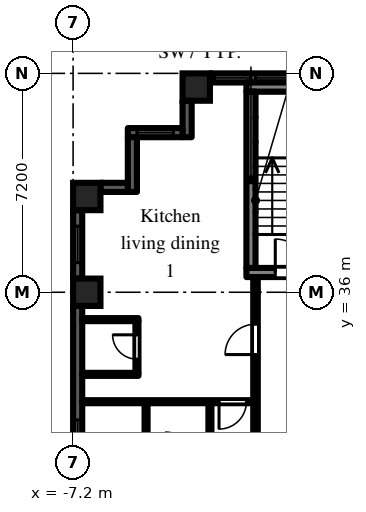
"""IFC4 building model, lengths in metres.
Left out: names, types, materials, properties, quantities, classifications, styles, units other than length and angle.
Written with IfcOpenShell. Run it as: python <this file> out.ifc"""

import sys

from ifc_helpers import new_model, si_unit, direction, frame, frame_2d, origin, origin_2d, place, context, subcontext, project, spatial, rectangle, extrude, element, fill, save


model = new_model("IFC4")
c1 = context("Model", 3, precision=1e-05, world=origin(), true_north=direction((0.0, 1.0)))
c2 = subcontext(c1, "Body", "Model", "MODEL_VIEW")
j1 = project(units=[si_unit("LENGTHUNIT", "METRE"), si_unit("PLANEANGLEUNIT", "RADIAN")], contexts=[c1])
p1 = place(None, origin())
s1 = spatial("IfcSite", under=j1, at=p1, CompositionType="ELEMENT")
p2 = place(p1, origin())
s2 = spatial("IfcBuilding", under=s1, at=p2, CompositionType="ELEMENT")
p3 = place(p2, frame((0.0, 0.0, 11.7)))
s3 = spatial("IfcBuildingStorey", under=s2, at=p3, CompositionType="ELEMENT", Elevation=11.7)
for number, where, z_axis, x_axis in (
    (1, (-6.75, 36.0, 0.0), (0.0, 0.0, 1.0), (1.0, 0.0, 0.0)),
    (2, (-6.75, 39.15, 0.0), (0.0, 0.0, 1.0), (1.0, 0.0, 0.0)),
    (3, (-3.15, 42.75, 0.0), (0.0, 0.0, 1.0), (1.0, 0.0, 0.0)),
):
    element("IfcColumn", number, at=place(p3, frame(where, z_axis=z_axis, x_axis=x_axis)), inside=s3, PredefinedType="COLUMN", context=c2, shape_type="SweptSolid", body=[
        extrude(rectangle(XDim=0.9, YDim=0.9, at=origin_2d()), origin(), (0.0, 0.0, 1.0), 3.0),
    ])
p4 = place(p3, frame((2.7, 43.05, 0.0), z_axis=(0.0, 0.0, 1.0), x_axis=(-1.0, 0.0, 0.0)))
e4 = element("IfcWall", 4, at=p4, inside=s3, PredefinedType="SOLIDWALL", context=c2, shape_type="SweptSolid", body=[
    extrude(rectangle(XDim=5.4, YDim=0.3, at=frame_2d((2.7, 0.0))), origin(), (0.0, 0.0, 1.0), 2.1),
])
p5 = place(p4, frame((1.5, 0.0, 0.2)))
e5 = element("IfcOpeningElement", 5, at=p5, cuts=e4, PredefinedType="OPENING", context=c2, shape_type="SweptSolid", body=[
    extrude(rectangle(XDim=2.4, YDim=1.85, at=frame_2d((1.2, 0.925))), frame((0.0, 0.16, 0.0), z_axis=(0.0, -1.0, 0.0), x_axis=(1.0, 0.0, 0.0)), (0.0, 0.0, 1.0), 0.32),
])
p6 = place(p4, frame((0.15, 0.0, 0.2)))
e6 = element("IfcOpeningElement", 6, at=p6, cuts=e4, PredefinedType="OPENING", context=c2, shape_type="SweptSolid", body=[
    extrude(rectangle(XDim=1.2, YDim=1.85, at=frame_2d((0.6, 0.925))), frame((0.0, 0.16, 0.0), z_axis=(0.0, -1.0, 0.0), x_axis=(1.0, 0.0, 0.0)), (0.0, 0.0, 1.0), 0.32),
])
p7 = place(p4, frame((4.05, 0.0, 0.2)))
e7 = element("IfcOpeningElement", 7, at=p7, cuts=e4, PredefinedType="OPENING", context=c2, shape_type="SweptSolid", body=[
    extrude(rectangle(XDim=1.2, YDim=1.85, at=frame_2d((0.6, 0.925))), frame((0.0, 0.16, 0.0), z_axis=(0.0, -1.0, 0.0), x_axis=(1.0, 0.0, 0.0)), (0.0, 0.0, 1.0), 0.32),
])
p8 = place(p3, frame((-3.45, 42.3, 0.0), z_axis=(0.0, 0.0, 1.0), x_axis=(0.0, -1.0, 0.0)))
e8 = element("IfcWall", 8, at=p8, inside=s3, PredefinedType="SOLIDWALL", context=c2, shape_type="SweptSolid", body=[
    extrude(rectangle(XDim=1.2, YDim=0.3, at=frame_2d((0.6, 0.0))), origin(), (0.0, 0.0, 1.0), 2.575),
])
p9 = place(p3, frame((-3.6, 41.25, 0.0), z_axis=(0.0, 0.0, 1.0), x_axis=(-1.0, 0.0, 0.0)))
e9 = element("IfcWall", 9, at=p9, inside=s3, PredefinedType="SOLIDWALL", context=c2, shape_type="SweptSolid", body=[
    extrude(rectangle(XDim=1.8, YDim=0.3, at=frame_2d((0.9, 0.0))), origin(), (0.0, 0.0, 1.0), 2.575),
])
p10 = place(p9, frame((0.3, 0.0, 0.2)))
e10 = element("IfcOpeningElement", 10, at=p10, cuts=e9, PredefinedType="OPENING", context=c2, shape_type="SweptSolid", body=[
    extrude(rectangle(XDim=1.2, YDim=1.85, at=frame_2d((0.6, 0.925))), frame((0.0, 0.16, 0.0), z_axis=(0.0, -1.0, 0.0), x_axis=(1.0, 0.0, 0.0)), (0.0, 0.0, 1.0), 0.32),
])
p11 = place(p3, frame((-5.25, 41.1, 0.0), z_axis=(0.0, 0.0, 1.0), x_axis=(0.0, -1.0, 0.0)))
e11 = element("IfcWall", 11, at=p11, inside=s3, PredefinedType="SOLIDWALL", context=c2, shape_type="SweptSolid", body=[
    extrude(rectangle(XDim=1.8, YDim=0.3, at=frame_2d((0.9, 0.0))), origin(), (0.0, 0.0, 1.0), 2.575),
])
p12 = place(p3, frame((-5.4, 39.45, 0.0), z_axis=(0.0, 0.0, 1.0), x_axis=(-1.0, 0.0, 0.0)))
e12 = element("IfcWall", 12, at=p12, inside=s3, PredefinedType="SOLIDWALL", context=c2, shape_type="SweptSolid", body=[
    extrude(rectangle(XDim=0.9, YDim=0.3, at=frame_2d((0.45, 0.0))), origin(), (0.0, 0.0, 1.0), 2.575),
])
p13 = place(p3, frame((-7.05, 38.7, 0.0), z_axis=(0.0, 0.0, 1.0), x_axis=(0.0, -1.0, 0.0)))
e13 = element("IfcWall", 13, at=p13, inside=s3, PredefinedType="SOLIDWALL", context=c2, shape_type="SweptSolid", body=[
    extrude(rectangle(XDim=2.25, YDim=0.3, at=frame_2d((1.125, 0.0))), origin(), (0.0, 0.0, 1.0), 2.1),
])
p14 = place(p13, frame((0.525, 0.0, 0.2)))
e14 = element("IfcOpeningElement", 14, at=p14, cuts=e13, PredefinedType="OPENING", context=c2, shape_type="SweptSolid", body=[
    extrude(rectangle(XDim=1.2, YDim=1.85, at=frame_2d((0.6, 0.925))), frame((0.0, 0.16, 0.0), z_axis=(0.0, -1.0, 0.0), x_axis=(1.0, 0.0, 0.0)), (0.0, 0.0, 1.0), 0.32),
])
p15 = place(p3, frame((-7.05, 35.55, 0.0), z_axis=(0.0, 0.0, 1.0), x_axis=(0.0, -1.0, 0.0)))
e15 = element("IfcWall", 15, at=p15, inside=s3, PredefinedType="SOLIDWALL", context=c2, shape_type="SweptSolid", body=[
    extrude(rectangle(XDim=6.3, YDim=0.3, at=frame_2d((3.15, 0.0))), origin(), (0.0, 0.0, 1.0), 2.1),
])
p16 = place(p15, frame((3.75, 0.0, 0.2)))
e16 = element("IfcOpeningElement", 16, at=p16, cuts=e15, PredefinedType="OPENING", context=c2, shape_type="SweptSolid", body=[
    extrude(rectangle(XDim=2.4, YDim=1.85, at=frame_2d((1.2, 0.925))), frame((0.0, 0.16, 0.0), z_axis=(0.0, -1.0, 0.0), x_axis=(1.0, 0.0, 0.0)), (0.0, 0.0, 1.0), 0.32),
])
p17 = place(p3, frame((-1.5, 36.65, 0.0), z_axis=(0.0, 0.0, 1.0), x_axis=(1.0, 0.0, 0.0)))
e17 = element("IfcWall", 17, at=p17, inside=s3, PredefinedType="SHEAR", context=c2, shape_type="SweptSolid", body=[
    extrude(rectangle(XDim=3.0, YDim=0.3, at=frame_2d((1.5, 0.0))), origin(), (0.0, 0.0, 1.0), 2.575),
])
p18 = place(p17, frame((0.95, 0.0, 0.0)))
e18 = element("IfcOpeningElement", 18, at=p18, cuts=e17, PredefinedType="OPENING", context=c2, shape_type="SweptSolid", body=[
    extrude(rectangle(XDim=1.1, YDim=2.1, at=frame_2d((0.55, 1.05))), frame((0.0, 0.16, 0.0), z_axis=(0.0, -1.0, 0.0), x_axis=(1.0, 0.0, 0.0)), (0.0, 0.0, 1.0), 0.32),
])
p19 = place(p3, frame((-1.5, 42.75, 0.0), z_axis=(0.0, 0.0, 1.0), x_axis=(1.0, 0.0, 0.0)))
e19 = element("IfcWall", 19, at=p19, inside=s3, PredefinedType="SHEAR", context=c2, shape_type="SweptSolid", body=[
    extrude(rectangle(XDim=3.0, YDim=0.3, at=frame_2d((1.5, 0.0))), origin(), (0.0, 0.0, 1.0), 2.575),
])
p20 = place(p3, frame((-1.35, 36.8, 0.0), z_axis=(0.0, 0.0, 1.0), x_axis=(0.0, 1.0, 0.0)))
e20 = element("IfcWall", 20, at=p20, inside=s3, PredefinedType="SHEAR", context=c2, shape_type="SweptSolid", body=[
    extrude(rectangle(XDim=5.8, YDim=0.3, at=frame_2d((2.9, 0.0))), origin(), (0.0, 0.0, 1.0), 2.575),
])
p21 = place(p3, frame((-6.9, 32.4, 0.0), z_axis=(0.0, 0.0, 1.0), x_axis=(1.0, 0.0, 0.0)))
e21 = element("IfcWall", 21, at=p21, inside=s3, PredefinedType="PARTITIONING", context=c2, shape_type="SweptSolid", body=[
    extrude(rectangle(XDim=5.625, YDim=0.1, at=frame_2d((2.812, 0.0))), origin(), (0.0, 0.0, 1.0), 2.575),
])
p22 = place(p21, frame((4.5, 0.0, 0.0)))
e22 = element("IfcOpeningElement", 22, at=p22, cuts=e21, PredefinedType="OPENING", context=c2, shape_type="SweptSolid", body=[
    extrude(rectangle(XDim=0.9, YDim=2.1, at=frame_2d((0.45, 1.05))), frame((0.0, 0.06, 0.0), z_axis=(0.0, -1.0, 0.0), x_axis=(1.0, 0.0, 0.0)), (0.0, 0.0, 1.0), 0.12),
])
for number, where, z_axis, x_axis in (
    (23, (-6.9, 33.3, 0.0), (0.0, 0.0, 1.0), (1.0, 0.0, 0.0)),
    (24, (-6.9, 35.1, 0.0), (0.0, 0.0, 1.0), (1.0, 0.0, 0.0)),
):
    element("IfcWall", number, at=place(p3, frame(where, z_axis=z_axis, x_axis=x_axis)), inside=s3, PredefinedType="PARTITIONING", context=c2, shape_type="SweptSolid", body=[
        extrude(rectangle(XDim=1.85, YDim=0.1, at=frame_2d((0.925, 0.0))), origin(), (0.0, 0.0, 1.0), 2.575),
    ])
p23 = place(p3, frame((-5.1, 33.35, 0.0), z_axis=(0.0, 0.0, 1.0), x_axis=(0.0, 1.0, 0.0)))
e25 = element("IfcWall", 25, at=p23, inside=s3, PredefinedType="PARTITIONING", context=c2, shape_type="SweptSolid", body=[
    extrude(rectangle(XDim=1.7, YDim=0.1, at=frame_2d((0.85, 0.0))), origin(), (0.0, 0.0, 1.0), 2.575),
])
p24 = place(p23, frame((0.45, 0.0, 0.0)))
e26 = element("IfcOpeningElement", 26, at=p24, cuts=e25, PredefinedType="OPENING", context=c2, shape_type="SweptSolid", body=[
    extrude(rectangle(XDim=0.8, YDim=2.1, at=frame_2d((0.4, 1.05))), frame((0.0, 0.06, 0.0), z_axis=(0.0, -1.0, 0.0), x_axis=(1.0, 0.0, 0.0)), (0.0, 0.0, 1.0), 0.12),
])
p25 = place(p3, frame((-4.8, 30.55, 0.0), z_axis=(0.0, 0.0, 1.0), x_axis=(0.0, 1.0, 0.0)))
e27 = element("IfcWall", 27, at=p25, inside=s3, PredefinedType="PARTITIONING", context=c2, shape_type="SweptSolid", body=[
    extrude(rectangle(XDim=1.8, YDim=0.1, at=frame_2d((0.9, 0.0))), origin(), (0.0, 0.0, 1.0), 2.575),
])
p26 = place(p3, frame((-2.7, 14.462, 0.0), z_axis=(0.0, 0.0, 1.0), x_axis=(0.0, 1.0, 0.0)))
e28 = element("IfcWall", 28, at=p26, inside=s3, PredefinedType="PARTITIONING", context=c2, shape_type="SweptSolid", body=[
    extrude(rectangle(XDim=17.888, YDim=0.1, at=frame_2d((8.944, 0.0))), origin(), (0.0, 0.0, 1.0), 2.575),
])
p27 = place(p26, frame((2.188, 0.0, 0.0)))
e29 = element("IfcOpeningElement", 29, at=p27, cuts=e28, PredefinedType="OPENING", context=c2, shape_type="SweptSolid", body=[
    extrude(rectangle(XDim=0.9, YDim=2.1, at=frame_2d((0.45, 1.05))), frame((0.0, 0.06, 0.0), z_axis=(0.0, -1.0, 0.0), x_axis=(1.0, 0.0, 0.0)), (0.0, 0.0, 1.0), 0.12),
])
p28 = place(p26, frame((5.788, 0.0, 0.0)))
e30 = element("IfcOpeningElement", 30, at=p28, cuts=e28, PredefinedType="OPENING", context=c2, shape_type="SweptSolid", body=[
    extrude(rectangle(XDim=0.9, YDim=2.1, at=frame_2d((0.45, 1.05))), frame((0.0, 0.06, 0.0), z_axis=(0.0, -1.0, 0.0), x_axis=(1.0, 0.0, 0.0)), (0.0, 0.0, 1.0), 0.12),
])
p29 = place(p26, frame((7.587, 0.0, 0.0)))
e31 = element("IfcOpeningElement", 31, at=p29, cuts=e28, PredefinedType="OPENING", context=c2, shape_type="SweptSolid", body=[
    extrude(rectangle(XDim=0.9, YDim=2.1, at=frame_2d((0.45, 1.05))), frame((0.0, 0.06, 0.0), z_axis=(0.0, -1.0, 0.0), x_axis=(1.0, 0.0, 0.0)), (0.0, 0.0, 1.0), 0.12),
])
p30 = place(p26, frame((12.988, 0.0, 0.0)))
e32 = element("IfcOpeningElement", 32, at=p30, cuts=e28, PredefinedType="OPENING", context=c2, shape_type="SweptSolid", body=[
    extrude(rectangle(XDim=0.9, YDim=2.1, at=frame_2d((0.45, 1.05))), frame((0.0, 0.06, 0.0), z_axis=(0.0, -1.0, 0.0), x_axis=(1.0, 0.0, 0.0)), (0.0, 0.0, 1.0), 0.12),
])
p31 = place(p26, frame((14.788, 0.0, 0.0)))
e33 = element("IfcOpeningElement", 33, at=p31, cuts=e28, PredefinedType="OPENING", context=c2, shape_type="SweptSolid", body=[
    extrude(rectangle(XDim=0.9, YDim=2.1, at=frame_2d((0.45, 1.05))), frame((0.0, 0.06, 0.0), z_axis=(0.0, -1.0, 0.0), x_axis=(1.0, 0.0, 0.0)), (0.0, 0.0, 1.0), 0.12),
])
p32 = place(p3, frame((-1.2, 1.125, 0.0), z_axis=(0.0, 0.0, 1.0), x_axis=(0.0, 1.0, 0.0)))
e34 = element("IfcWall", 34, at=p32, inside=s3, PredefinedType="PARTITIONING", context=c2, shape_type="SweptSolid", body=[
    extrude(rectangle(XDim=35.375, YDim=0.15, at=frame_2d((17.688, 0.0))), origin(), (0.0, 0.0, 1.0), 2.575),
])
p33 = place(p32, frame((2.625, 0.0, 0.0)))
e35 = element("IfcOpeningElement", 35, at=p33, cuts=e34, PredefinedType="OPENING", context=c2, shape_type="SweptSolid", body=[
    extrude(rectangle(XDim=0.9, YDim=2.1, at=frame_2d((0.45, 1.05))), frame((0.0, 0.085, 0.0), z_axis=(0.0, -1.0, 0.0), x_axis=(1.0, 0.0, 0.0)), (0.0, 0.0, 1.0), 0.17),
])
p34 = place(p32, frame((11.025, 0.0, 0.0)))
e36 = element("IfcOpeningElement", 36, at=p34, cuts=e34, PredefinedType="OPENING", context=c2, shape_type="SweptSolid", body=[
    extrude(rectangle(XDim=0.9, YDim=2.1, at=frame_2d((0.45, 1.05))), frame((0.0, 0.085, 0.0), z_axis=(0.0, -1.0, 0.0), x_axis=(1.0, 0.0, 0.0)), (0.0, 0.0, 1.0), 0.17),
])
p35 = place(p32, frame((32.825, 0.0, 0.0)))
e37 = element("IfcOpeningElement", 37, at=p35, cuts=e34, PredefinedType="OPENING", context=c2, shape_type="SweptSolid", body=[
    extrude(rectangle(XDim=1.0, YDim=2.1, at=frame_2d((0.5, 1.05))), frame((0.0, 0.085, 0.0), z_axis=(0.0, -1.0, 0.0), x_axis=(1.0, 0.0, 0.0)), (0.0, 0.0, 1.0), 0.17),
])
p36 = place(p5, origin())
e38 = element("IfcWindow", 38, at=p36, inside=s3, PartitioningType="SINGLE_PANEL", PredefinedType="WINDOW", context=c2, shape_type="SweptSolid", body=[
    extrude(rectangle(XDim=2.4, YDim=1.85, at=frame_2d((1.2, 0.925))), frame((0.0, 0.03, 0.0), z_axis=(0.0, -1.0, 0.0), x_axis=(1.0, 0.0, 0.0)), (0.0, 0.0, 1.0), 0.06),
])
fill(e5, e38)
p37 = place(p7, origin())
e39 = element("IfcWindow", 39, at=p37, inside=s3, PartitioningType="SINGLE_PANEL", PredefinedType="WINDOW", context=c2, shape_type="SweptSolid", body=[
    extrude(rectangle(XDim=1.2, YDim=1.85, at=frame_2d((0.6, 0.925))), frame((0.0, 0.03, 0.0), z_axis=(0.0, -1.0, 0.0), x_axis=(1.0, 0.0, 0.0)), (0.0, 0.0, 1.0), 0.06),
])
fill(e7, e39)
p38 = place(p10, origin())
e40 = element("IfcWindow", 40, at=p38, inside=s3, PartitioningType="SINGLE_PANEL", PredefinedType="WINDOW", context=c2, shape_type="SweptSolid", body=[
    extrude(rectangle(XDim=1.2, YDim=1.85, at=frame_2d((0.6, 0.925))), frame((0.0, 0.03, 0.0), z_axis=(0.0, -1.0, 0.0), x_axis=(1.0, 0.0, 0.0)), (0.0, 0.0, 1.0), 0.06),
])
fill(e10, e40)
p39 = place(p14, origin())
e41 = element("IfcWindow", 41, at=p39, inside=s3, PartitioningType="SINGLE_PANEL", PredefinedType="WINDOW", context=c2, shape_type="SweptSolid", body=[
    extrude(rectangle(XDim=1.2, YDim=1.85, at=frame_2d((0.6, 0.925))), frame((0.0, 0.03, 0.0), z_axis=(0.0, -1.0, 0.0), x_axis=(1.0, 0.0, 0.0)), (0.0, 0.0, 1.0), 0.06),
])
fill(e14, e41)
p40 = place(p16, origin())
e42 = element("IfcWindow", 42, at=p40, inside=s3, PartitioningType="SINGLE_PANEL", PredefinedType="WINDOW", context=c2, shape_type="SweptSolid", body=[
    extrude(rectangle(XDim=2.4, YDim=1.85, at=frame_2d((1.2, 0.925))), frame((0.0, 0.03, 0.0), z_axis=(0.0, -1.0, 0.0), x_axis=(1.0, 0.0, 0.0)), (0.0, 0.0, 1.0), 0.06),
])
fill(e16, e42)
p41 = place(p18, origin())
e43 = element("IfcDoor", 43, at=p41, inside=s3, OperationType="SINGLE_SWING_LEFT", PredefinedType="DOOR", context=c2, shape_type="SweptSolid", body=[
    extrude(rectangle(XDim=1.1, YDim=2.1, at=frame_2d((0.55, 1.05))), frame((0.0, 0.025, 0.0), z_axis=(0.0, -1.0, 0.0), x_axis=(1.0, 0.0, 0.0)), (0.0, 0.0, 1.0), 0.05),
])
fill(e18, e43)
p42 = place(p24, origin())
e44 = element("IfcDoor", 44, at=p42, inside=s3, OperationType="SINGLE_SWING_RIGHT", PredefinedType="DOOR", context=c2, shape_type="SweptSolid", body=[
    extrude(rectangle(XDim=0.8, YDim=2.1, at=frame_2d((0.4, 1.05))), frame((0.0, 0.025, 0.0), z_axis=(0.0, -1.0, 0.0), x_axis=(1.0, 0.0, 0.0)), (0.0, 0.0, 1.0), 0.05),
])
fill(e26, e44)
p43 = place(p35, origin())
e45 = element("IfcDoor", 45, at=p43, inside=s3, OperationType="SINGLE_SWING_LEFT", PredefinedType="DOOR", context=c2, shape_type="SweptSolid", body=[
    extrude(rectangle(XDim=1.0, YDim=2.1, at=frame_2d((0.5, 1.05))), frame((0.0, 0.025, 0.0), z_axis=(0.0, -1.0, 0.0), x_axis=(1.0, 0.0, 0.0)), (0.0, 0.0, 1.0), 0.05),
])
fill(e37, e45)
p44 = place(p22, frame((0.9, 0.0, 0.0), z_axis=(0.0, 0.0, 1.0), x_axis=(-1.0, 0.0, 0.0)))
e46 = element("IfcDoor", 46, at=p44, inside=s3, OperationType="SINGLE_SWING_RIGHT", PredefinedType="DOOR", context=c2, shape_type="SweptSolid", body=[
    extrude(rectangle(XDim=0.9, YDim=2.1, at=frame_2d((0.45, 1.05))), frame((0.0, 0.025, 0.0), z_axis=(0.0, -1.0, 0.0), x_axis=(1.0, 0.0, 0.0)), (0.0, 0.0, 1.0), 0.05),
])
fill(e22, e46)
save(model, sys.argv[1])
